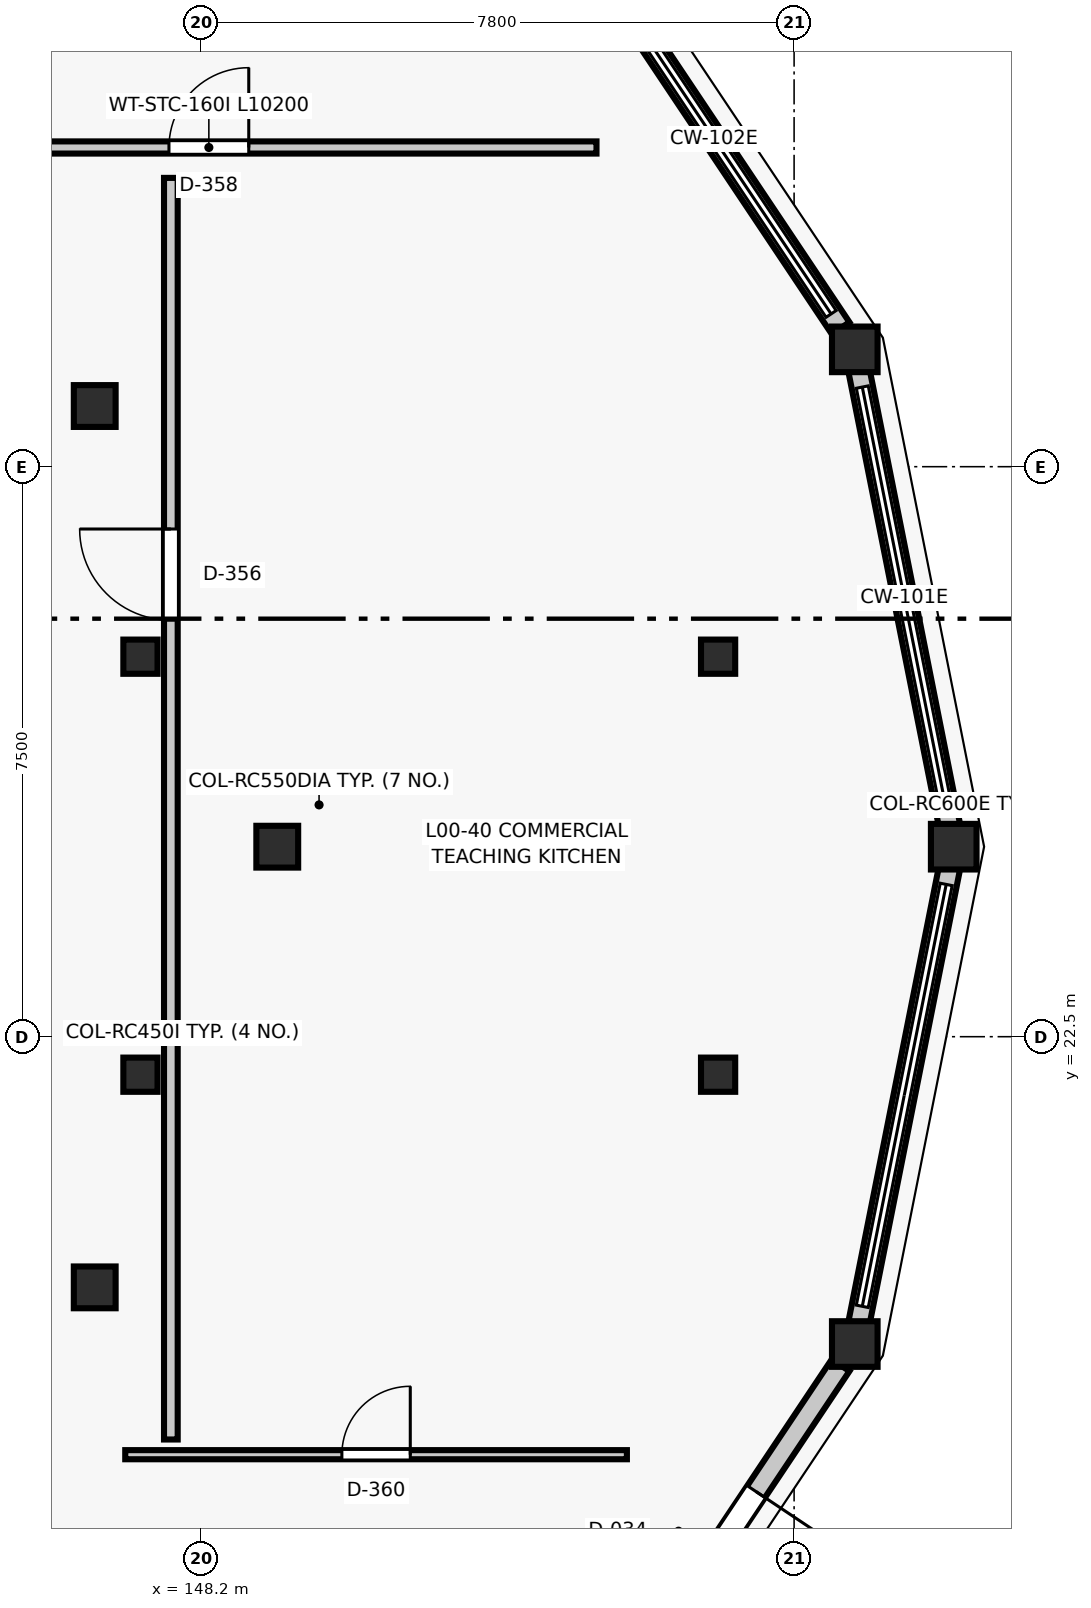
"""IFC4 building model, lengths in metres.
Left out: names, types, materials, properties, quantities, classifications, styles, units other than length and angle.
Written with IfcOpenShell. Run it as: python <this file> out.ifc"""

import sys

from ifc_helpers import new_model, si_unit, direction, frame, frame_2d, origin, origin_2d, place, context, subcontext, project, spatial, rectangle, circle, extrude, element, fill, save


model = new_model("IFC4")
c1 = context("Model", 3, precision=1e-05, world=origin(), true_north=direction((0.0, 1.0)))
c2 = subcontext(c1, "Body", "Model", "MODEL_VIEW")
j1 = project(units=[si_unit("LENGTHUNIT", "METRE"), si_unit("PLANEANGLEUNIT", "RADIAN")], contexts=[c1])
p1 = place(None, origin())
s1 = spatial("IfcSite", under=j1, at=p1, CompositionType="ELEMENT")
p2 = place(p1, origin())
s2 = spatial("IfcBuilding", under=s1, at=p2, CompositionType="ELEMENT")
p3 = place(p2, origin())
s3 = spatial("IfcBuildingStorey", under=s2, at=p3, CompositionType="ELEMENT", Elevation=0.0)
for number, where, z_axis, x_axis in (
    (1, (147.4, 22.0, 0.0), (0.0, 0.0, 1.0), (1.0, 0.0, 0.0)),
    (2, (155.0, 22.0, 0.0), (0.0, 0.0, 1.0), (1.0, 0.0, 0.0)),
    (3, (155.0, 27.5, 0.0), (0.0, 0.0, 1.0), (1.0, 0.0, 0.0)),
    (4, (147.4, 27.5, 0.0), (0.0, 0.0, 1.0), (1.0, 0.0, 0.0)),
):
    element("IfcColumn", number, at=place(p3, frame(where, z_axis=z_axis, x_axis=x_axis)), inside=s3, PredefinedType="COLUMN", context=c2, shape_type="SweptSolid", body=[
        extrude(rectangle(XDim=0.45, YDim=0.45, at=origin_2d()), origin(), (0.0, 0.0, 1.0), 4.5),
    ])
for number, where, z_axis, x_axis in (
    (5, (149.2, 25.0, 0.0), (0.0, 0.0, 1.0), (1.0, 0.0, 0.0)),
    (6, (146.798, 30.798, 0.0), (0.0, 0.0, 1.0), (1.0, 0.0, 0.0)),
    (7, (146.798, 19.202, 0.0), (0.0, 0.0, 1.0), (1.0, 0.0, 0.0)),
):
    element("IfcColumn", number, at=place(p3, frame(where, z_axis=z_axis, x_axis=x_axis)), inside=s3, PredefinedType="COLUMN", context=c2, shape_type="SweptSolid", body=[
        extrude(circle(Radius=0.275, at=origin_2d()), origin(), (0.0, 0.0, 1.0), 4.5),
    ])
for number, where, z_axis, x_axis in (
    (8, (158.1, 25.0, 0.0), (0.0, 0.0, 1.0), (1.0, 0.0, 0.0)),
    (9, (156.798, 31.544, 0.0), (0.0, 0.0, 1.0), (1.0, 0.0, 0.0)),
    (10, (156.798, 18.456, 0.0), (0.0, 0.0, 1.0), (1.0, 0.0, 0.0)),
):
    element("IfcColumn", number, at=place(p3, frame(where, z_axis=z_axis, x_axis=x_axis)), inside=s3, PredefinedType="COLUMN", context=c2, shape_type="SweptSolid", body=[
        extrude(rectangle(XDim=0.6, YDim=0.6, at=origin_2d()), origin(), (0.0, 0.0, 1.0), 4.5),
    ])
p4 = place(p3, frame((156.853, 31.268, 0.0), z_axis=(0.0, 0.0, 1.0), x_axis=(0.195101780047, -0.98078300119, 0.0)))
e11 = element("IfcWall", 11, at=p4, inside=s3, PredefinedType="STANDARD", context=c2, shape_type="SweptSolid", body=[
    extrude(rectangle(XDim=6.11, YDim=0.28, at=frame_2d((3.055, 0.0))), origin(), (0.0, 0.0, 1.0), 0.8),
])
p5 = place(p3, frame((153.278, 36.812, 0.0), z_axis=(0.0, 0.0, 1.0), x_axis=(0.555573083966, -0.831467707354, 0.0)))
e12 = element("IfcWall", 12, at=p5, inside=s3, PredefinedType="STANDARD", context=c2, shape_type="SweptSolid", body=[
    extrude(rectangle(XDim=6.0, YDim=0.28, at=frame_2d((3.0, 0.0))), origin(), (0.0, 0.0, 1.0), 0.8),
])
p6 = place(p3, frame((156.612, 18.177, 0.0), z_axis=(0.0, 0.0, 1.0), x_axis=(-0.555573083966, -0.831467707354, 0.0)))
e13 = element("IfcWall", 13, at=p6, inside=s3, PredefinedType="STANDARD", context=c2, shape_type="SweptSolid", body=[
    extrude(rectangle(XDim=6.0, YDim=0.28, at=frame_2d((3.0, 0.0))), origin(), (0.0, 0.0, 1.0), 3.495),
])
p7 = place(p6, frame((2.0, 0.0, 0.0)))
e14 = element("IfcOpeningElement", 14, at=p7, cuts=e13, PredefinedType="OPENING", context=c2, shape_type="SweptSolid", body=[
    extrude(rectangle(XDim=2.0, YDim=2.3, at=frame_2d((1.0, 1.15))), frame((0.0, 0.15, 0.0), z_axis=(0.0, -1.0, 0.0), x_axis=(1.0, 0.0, 0.0)), (0.0, 0.0, 1.0), 0.3),
])
p8 = place(p3, frame((158.045, 24.725, 0.0), z_axis=(0.0, 0.0, 1.0), x_axis=(-0.195101780047, -0.98078300119, 0.0)))
e15 = element("IfcWall", 15, at=p8, inside=s3, PredefinedType="STANDARD", context=c2, shape_type="SweptSolid", body=[
    extrude(rectangle(XDim=6.11, YDim=0.28, at=frame_2d((3.055, 0.0))), origin(), (0.0, 0.0, 1.0), 0.35),
])
p9 = place(p3, frame((147.8, 17.2, 0.0), z_axis=(0.0, 0.0, 1.0), x_axis=(0.0, 1.0, 0.0)))
e16 = element("IfcWall", 16, at=p9, inside=s3, PredefinedType="PARTITIONING", context=c2, shape_type="SweptSolid", body=[
    extrude(rectangle(XDim=16.6, YDim=0.18, at=frame_2d((8.3, 0.0))), origin(), (0.0, 0.0, 1.0), 4.255),
])
p10 = place(p9, frame((10.78, 0.0, 0.0)))
e17 = element("IfcOpeningElement", 17, at=p10, cuts=e16, PredefinedType="OPENING", context=c2, shape_type="SweptSolid", body=[
    extrude(rectangle(XDim=1.2, YDim=2.15, at=frame_2d((0.6, 1.075))), frame((0.0, 0.1, 0.0), z_axis=(0.0, -1.0, 0.0), x_axis=(1.0, 0.0, 0.0)), (0.0, 0.0, 1.0), 0.2),
])
p11 = place(p3, frame((143.2, 34.2, 0.0), z_axis=(0.0, 0.0, 1.0), x_axis=(1.0, 0.0, 0.0)))
e18 = element("IfcWall", 18, at=p11, inside=s3, PredefinedType="PARTITIONING", context=c2, shape_type="SweptSolid", body=[
    extrude(rectangle(XDim=10.2, YDim=0.16, at=frame_2d((5.1, 0.0))), origin(), (0.0, 0.0, 1.0), 4.255),
])
p12 = place(p11, frame((4.575, 0.0, 0.0)))
e19 = element("IfcOpeningElement", 19, at=p12, cuts=e18, PredefinedType="OPENING", context=c2, shape_type="SweptSolid", body=[
    extrude(rectangle(XDim=1.05, YDim=2.1, at=frame_2d((0.525, 1.05))), frame((0.0, 0.09, 0.0), z_axis=(0.0, -1.0, 0.0), x_axis=(1.0, 0.0, 0.0)), (0.0, 0.0, 1.0), 0.18),
])
p13 = place(p3, frame((147.2, 17.0, 0.0), z_axis=(0.0, 0.0, 1.0), x_axis=(1.0, 0.0, 0.0)))
e20 = element("IfcWall", 20, at=p13, inside=s3, PredefinedType="PARTITIONING", context=c2, shape_type="SweptSolid", body=[
    extrude(rectangle(XDim=6.6, YDim=0.12, at=frame_2d((3.3, 0.0))), origin(), (0.0, 0.0, 1.0), 4.255),
])
p14 = place(p13, frame((2.85, 0.0, 0.0)))
e21 = element("IfcOpeningElement", 21, at=p14, cuts=e20, PredefinedType="OPENING", context=c2, shape_type="SweptSolid", body=[
    extrude(rectangle(XDim=0.9, YDim=2.1, at=frame_2d((0.45, 1.05))), frame((0.0, 0.07, 0.0), z_axis=(0.0, -1.0, 0.0), x_axis=(1.0, 0.0, 0.0)), (0.0, 0.0, 1.0), 0.14),
])
p15 = place(p7, origin())
e22 = element("IfcDoor", 22, at=p15, inside=s3, OperationType="SINGLE_SWING_LEFT", PredefinedType="DOOR", context=c2, shape_type="SweptSolid", body=[
    extrude(rectangle(XDim=2.0, YDim=2.3, at=frame_2d((1.0, 1.15))), frame((0.0, 0.025, 0.0), z_axis=(0.0, -1.0, 0.0), x_axis=(1.0, 0.0, 0.0)), (0.0, 0.0, 1.0), 0.05),
])
fill(e14, e22)
p16 = place(p10, origin())
e23 = element("IfcDoor", 23, at=p16, inside=s3, OperationType="SINGLE_SWING_RIGHT", PredefinedType="DOOR", context=c2, shape_type="SweptSolid", body=[
    extrude(rectangle(XDim=1.2, YDim=2.15, at=frame_2d((0.6, 1.075))), frame((0.0, 0.025, 0.0), z_axis=(0.0, -1.0, 0.0), x_axis=(1.0, 0.0, 0.0)), (0.0, 0.0, 1.0), 0.05),
])
fill(e17, e23)
p17 = place(p12, origin())
e24 = element("IfcDoor", 24, at=p17, inside=s3, OperationType="SINGLE_SWING_RIGHT", PredefinedType="DOOR", context=c2, shape_type="SweptSolid", body=[
    extrude(rectangle(XDim=1.05, YDim=2.1, at=frame_2d((0.525, 1.05))), frame((0.0, 0.025, 0.0), z_axis=(0.0, -1.0, 0.0), x_axis=(1.0, 0.0, 0.0)), (0.0, 0.0, 1.0), 0.05),
])
fill(e19, e24)
p18 = place(p14, origin())
e25 = element("IfcDoor", 25, at=p18, inside=s3, OperationType="SINGLE_SWING_RIGHT", PredefinedType="DOOR", context=c2, shape_type="SweptSolid", body=[
    extrude(rectangle(XDim=0.9, YDim=2.1, at=frame_2d((0.45, 1.05))), frame((0.0, 0.025, 0.0), z_axis=(0.0, -1.0, 0.0), x_axis=(1.0, 0.0, 0.0)), (0.0, 0.0, 1.0), 0.05),
])
fill(e21, e25)
save(model, sys.argv[1])
